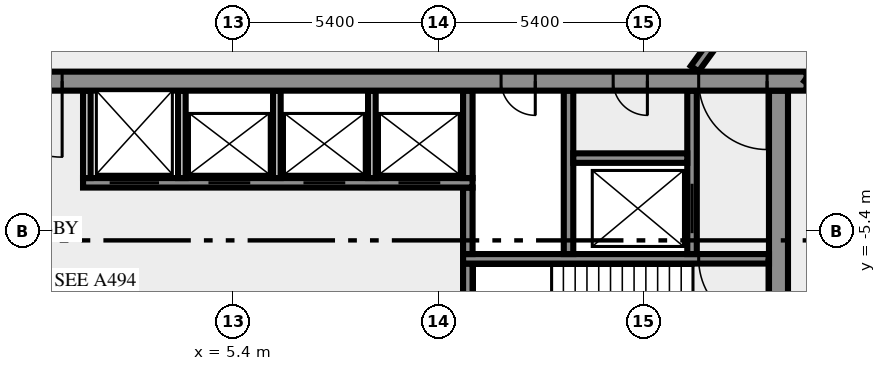
"""IFC4 building model, lengths in metres.
Left out: names, types, materials, properties, quantities, classifications, styles, units other than length and angle.
Written with IfcOpenShell. Run it as: python <this file> out.ifc"""

import sys

from ifc_helpers import new_model, si_unit, direction, frame, frame_2d, origin, place, context, subcontext, project, spatial, rectangle, extrude, element, fill, save


model = new_model("IFC4")
c1 = context("Model", 3, precision=1e-05, world=origin(), true_north=direction((0.0, 1.0)))
c2 = subcontext(c1, "Body", "Model", "MODEL_VIEW")
j1 = project(units=[si_unit("LENGTHUNIT", "METRE"), si_unit("PLANEANGLEUNIT", "RADIAN")], contexts=[c1])
p1 = place(None, origin())
s1 = spatial("IfcSite", under=j1, at=p1, CompositionType="ELEMENT")
p2 = place(p1, origin())
s2 = spatial("IfcBuilding", under=s1, at=p2, CompositionType="ELEMENT")
p3 = place(p2, frame((0.0, 0.0, 210.0)))
s3 = spatial("IfcBuildingStorey", under=s2, at=p3, CompositionType="ELEMENT", Elevation=210.0)
p4 = place(p3, frame((19.75, -10.5, 0.0), z_axis=(0.0, 0.0, 1.0), x_axis=(0.0, 1.0, 0.0)))
e1 = element("IfcWall", 1, at=p4, inside=s3, PredefinedType="SHEAR", context=c2, shape_type="SweptSolid", body=[
    extrude(rectangle(XDim=8.8, YDim=0.5, at=frame_2d((4.4, 0.0))), origin(), (0.0, 0.0, 1.0), 3.65),
])
p5 = place(p3, frame((11.575, -7.25, 0.0), z_axis=(0.0, 0.0, 1.0), x_axis=(0.0, 1.0, 0.0)))
e2 = element("IfcWall", 2, at=p5, inside=s3, PredefinedType="SHEAR", context=c2, shape_type="SweptSolid", body=[
    extrude(rectangle(XDim=1.0, YDim=0.25, at=frame_2d((0.5, 0.0))), origin(), (0.0, 0.0, 1.0), 3.65),
])
p6 = place(p3, frame((19.5, -6.125, 0.0), z_axis=(0.0, 0.0, 1.0), x_axis=(-1.0, 0.0, 0.0)))
e3 = element("IfcWall", 3, at=p6, inside=s3, PredefinedType="SHEAR", context=c2, shape_type="SweptSolid", body=[
    extrude(rectangle(XDim=8.05, YDim=0.25, at=frame_2d((4.025, 0.0))), origin(), (0.0, 0.0, 1.0), 3.65),
])
p7 = place(p6, frame((0.05, 0.0, 0.0)))
e4 = element("IfcOpeningElement", 4, at=p7, cuts=e3, PredefinedType="OPENING", context=c2, shape_type="SweptSolid", body=[
    extrude(rectangle(XDim=1.8, YDim=2.1, at=frame_2d((0.9, 1.05))), frame((0.0, 0.135, 0.0), z_axis=(0.0, -1.0, 0.0), x_axis=(1.0, 0.0, 0.0)), (0.0, 0.0, 1.0), 0.27),
])
p8 = place(p3, frame((11.575, -6.0, 0.0), z_axis=(0.0, 0.0, 1.0), x_axis=(0.0, 1.0, 0.0)))
e5 = element("IfcWall", 5, at=p8, inside=s3, PredefinedType="SHEAR", context=c2, shape_type="SweptSolid", body=[
    extrude(rectangle(XDim=1.75, YDim=0.25, at=frame_2d((0.875, 0.0))), origin(), (0.0, 0.0, 1.0), 3.65),
])
p9 = place(p3, frame((14.225, -6.0, 0.0), z_axis=(0.0, 0.0, 1.0), x_axis=(0.0, 1.0, 0.0)))
e6 = element("IfcWall", 6, at=p9, inside=s3, PredefinedType="SHEAR", context=c2, shape_type="SweptSolid", body=[
    extrude(rectangle(XDim=4.3, YDim=0.25, at=frame_2d((2.15, 0.0))), origin(), (0.0, 0.0, 1.0), 3.65),
])
p10 = place(p3, frame((17.475, -6.0, 0.0), z_axis=(0.0, 0.0, 1.0), x_axis=(0.0, 1.0, 0.0)))
e7 = element("IfcWall", 7, at=p10, inside=s3, PredefinedType="SHEAR", context=c2, shape_type="SweptSolid", body=[
    extrude(rectangle(XDim=4.3, YDim=0.25, at=frame_2d((2.15, 0.0))), origin(), (0.0, 0.0, 1.0), 3.65),
])
p11 = place(p10, frame((0.55, 0.0, 0.0)))
e8 = element("IfcOpeningElement", 8, at=p11, cuts=e7, PredefinedType="OPENING", context=c2, shape_type="SweptSolid", body=[
    extrude(rectangle(XDim=1.3, YDim=2.1, at=frame_2d((0.65, 1.05))), frame((0.0, 0.135, 0.0), z_axis=(0.0, -1.0, 0.0), x_axis=(1.0, 0.0, 0.0)), (0.0, 0.0, 1.0), 0.27),
])
p12 = place(p3, frame((1.45, -4.125, 0.0), z_axis=(0.0, 0.0, 1.0), x_axis=(1.0, 0.0, 0.0)))
e9 = element("IfcWall", 9, at=p12, inside=s3, PredefinedType="SHEAR", context=c2, shape_type="SweptSolid", body=[
    extrude(rectangle(XDim=10.25, YDim=0.25, at=frame_2d((5.125, 0.0))), origin(), (0.0, 0.0, 1.0), 3.65),
])
p13 = place(p12, frame((0.7, 0.0, 0.0)))
e10 = element("IfcOpeningElement", 10, at=p13, cuts=e9, PredefinedType="OPENING", context=c2, shape_type="SweptSolid", body=[
    extrude(rectangle(XDim=1.3, YDim=2.1, at=frame_2d((0.65, 1.05))), frame((0.0, 0.135, 0.0), z_axis=(0.0, -1.0, 0.0), x_axis=(1.0, 0.0, 0.0)), (0.0, 0.0, 1.0), 0.27),
])
p14 = place(p12, frame((3.3, 0.0, 0.0)))
e11 = element("IfcOpeningElement", 11, at=p14, cuts=e9, PredefinedType="OPENING", context=c2, shape_type="SweptSolid", body=[
    extrude(rectangle(XDim=1.1, YDim=2.1, at=frame_2d((0.55, 1.05))), frame((0.0, 0.135, 0.0), z_axis=(0.0, -1.0, 0.0), x_axis=(1.0, 0.0, 0.0)), (0.0, 0.0, 1.0), 0.27),
])
p15 = place(p12, frame((5.8, 0.0, 0.0)))
e12 = element("IfcOpeningElement", 12, at=p15, cuts=e9, PredefinedType="OPENING", context=c2, shape_type="SweptSolid", body=[
    extrude(rectangle(XDim=1.1, YDim=2.1, at=frame_2d((0.55, 1.05))), frame((0.0, 0.135, 0.0), z_axis=(0.0, -1.0, 0.0), x_axis=(1.0, 0.0, 0.0)), (0.0, 0.0, 1.0), 0.27),
])
p16 = place(p12, frame((8.3, 0.0, 0.0)))
e13 = element("IfcOpeningElement", 13, at=p16, cuts=e9, PredefinedType="OPENING", context=c2, shape_type="SweptSolid", body=[
    extrude(rectangle(XDim=1.1, YDim=2.1, at=frame_2d((0.55, 1.05))), frame((0.0, 0.135, 0.0), z_axis=(0.0, -1.0, 0.0), x_axis=(1.0, 0.0, 0.0)), (0.0, 0.0, 1.0), 0.27),
])
for number, where, z_axis, x_axis in (
    (14, (1.55, -4.0, 0.0), (0.0, 0.0, 1.0), (0.0, 1.0, 0.0)),
    (15, (4.05, -4.0, 0.0), (0.0, 0.0, 1.0), (0.0, 1.0, 0.0)),
    (16, (6.55, -4.0, 0.0), (0.0, 0.0, 1.0), (0.0, 1.0, 0.0)),
    (17, (9.05, -4.0, 0.0), (0.0, 0.0, 1.0), (0.0, 1.0, 0.0)),
):
    element("IfcWall", number, at=place(p3, frame(where, z_axis=z_axis, x_axis=x_axis)), inside=s3, PredefinedType="SOLIDWALL", context=c2, shape_type="SweptSolid", body=[
        extrude(rectangle(XDim=2.3, YDim=0.2, at=frame_2d((1.15, 0.0))), origin(), (0.0, 0.0, 1.0), 3.65),
    ])
p17 = place(p3, frame((11.575, -4.0, 0.0), z_axis=(0.0, 0.0, 1.0), x_axis=(0.0, 1.0, 0.0)))
e18 = element("IfcWall", 18, at=p17, inside=s3, PredefinedType="SHEAR", context=c2, shape_type="SweptSolid", body=[
    extrude(rectangle(XDim=2.3, YDim=0.25, at=frame_2d((1.15, 0.0))), origin(), (0.0, 0.0, 1.0), 3.65),
])
p18 = place(p3, frame((14.35, -3.475, 0.0), z_axis=(0.0, 0.0, 1.0), x_axis=(1.0, 0.0, 0.0)))
e19 = element("IfcWall", 19, at=p18, inside=s3, PredefinedType="SHEAR", context=c2, shape_type="SweptSolid", body=[
    extrude(rectangle(XDim=3.0, YDim=0.25, at=frame_2d((1.5, 0.0))), origin(), (0.0, 0.0, 1.0), 3.65),
])
p19 = place(p3, frame((20.49, -1.45, 0.0), z_axis=(0.0, 0.0, 1.0), x_axis=(-1.0, 0.0, 0.0)))
e20 = element("IfcWall", 20, at=p19, inside=s3, PredefinedType="SHEAR", context=c2, shape_type="SweptSolid", body=[
    extrude(rectangle(XDim=40.98, YDim=0.5, at=frame_2d((20.49, 0.0))), origin(), (0.0, 0.0, 1.0), 3.65),
])
p20 = place(p19, frame((38.14, 0.0, 0.0)))
e21 = element("IfcOpeningElement", 21, at=p20, cuts=e20, PredefinedType="OPENING", context=c2, shape_type="SweptSolid", body=[
    extrude(rectangle(XDim=1.8, YDim=2.1, at=frame_2d((0.9, 1.05))), frame((0.0, 0.26, 0.0), z_axis=(0.0, -1.0, 0.0), x_axis=(1.0, 0.0, 0.0)), (0.0, 0.0, 1.0), 0.52),
])
p21 = place(p19, frame((36.728, 0.0, 0.0)))
e22 = element("IfcOpeningElement", 22, at=p21, cuts=e20, PredefinedType="OPENING", context=c2, shape_type="SweptSolid", body=[
    extrude(rectangle(XDim=0.8, YDim=2.1, at=frame_2d((0.4, 1.05))), frame((0.0, 0.26, 0.0), z_axis=(0.0, -1.0, 0.0), x_axis=(1.0, 0.0, 0.0)), (0.0, 0.0, 1.0), 0.52),
])
p22 = place(p19, frame((35.153, 0.0, 0.0)))
e23 = element("IfcOpeningElement", 23, at=p22, cuts=e20, PredefinedType="OPENING", context=c2, shape_type="SweptSolid", body=[
    extrude(rectangle(XDim=0.8, YDim=2.1, at=frame_2d((0.4, 1.05))), frame((0.0, 0.26, 0.0), z_axis=(0.0, -1.0, 0.0), x_axis=(1.0, 0.0, 0.0)), (0.0, 0.0, 1.0), 0.52),
])
p23 = place(p19, frame((32.94, 0.0, 0.0)))
e24 = element("IfcOpeningElement", 24, at=p23, cuts=e20, PredefinedType="OPENING", context=c2, shape_type="SweptSolid", body=[
    extrude(rectangle(XDim=0.9, YDim=2.1, at=frame_2d((0.45, 1.05))), frame((0.0, 0.26, 0.0), z_axis=(0.0, -1.0, 0.0), x_axis=(1.0, 0.0, 0.0)), (0.0, 0.0, 1.0), 0.52),
])
p24 = place(p19, frame((30.702, 0.0, 0.0)))
e25 = element("IfcOpeningElement", 25, at=p24, cuts=e20, PredefinedType="OPENING", context=c2, shape_type="SweptSolid", body=[
    extrude(rectangle(XDim=0.9, YDim=2.1, at=frame_2d((0.45, 1.05))), frame((0.0, 0.26, 0.0), z_axis=(0.0, -1.0, 0.0), x_axis=(1.0, 0.0, 0.0)), (0.0, 0.0, 1.0), 0.52),
])
p25 = place(p19, frame((28.64, 0.0, 0.0)))
e26 = element("IfcOpeningElement", 26, at=p25, cuts=e20, PredefinedType="OPENING", context=c2, shape_type="SweptSolid", body=[
    extrude(rectangle(XDim=0.9, YDim=2.1, at=frame_2d((0.45, 1.05))), frame((0.0, 0.26, 0.0), z_axis=(0.0, -1.0, 0.0), x_axis=(1.0, 0.0, 0.0)), (0.0, 0.0, 1.0), 0.52),
])
p26 = place(p19, frame((25.778, 0.0, 0.0)))
e27 = element("IfcOpeningElement", 27, at=p26, cuts=e20, PredefinedType="OPENING", context=c2, shape_type="SweptSolid", body=[
    extrude(rectangle(XDim=0.9, YDim=2.1, at=frame_2d((0.45, 1.05))), frame((0.0, 0.26, 0.0), z_axis=(0.0, -1.0, 0.0), x_axis=(1.0, 0.0, 0.0)), (0.0, 0.0, 1.0), 0.52),
])
p27 = place(p19, frame((19.59, 0.0, 0.0)))
e28 = element("IfcOpeningElement", 28, at=p27, cuts=e20, PredefinedType="OPENING", context=c2, shape_type="SweptSolid", body=[
    extrude(rectangle(XDim=2.0, YDim=2.1, at=frame_2d((1.0, 1.05))), frame((0.0, 0.26, 0.0), z_axis=(0.0, -1.0, 0.0), x_axis=(1.0, 0.0, 0.0)), (0.0, 0.0, 1.0), 0.52),
])
p28 = place(p19, frame((7.14, 0.0, 0.0)))
e29 = element("IfcOpeningElement", 29, at=p28, cuts=e20, PredefinedType="OPENING", context=c2, shape_type="SweptSolid", body=[
    extrude(rectangle(XDim=0.9, YDim=2.1, at=frame_2d((0.45, 1.05))), frame((0.0, 0.26, 0.0), z_axis=(0.0, -1.0, 0.0), x_axis=(1.0, 0.0, 0.0)), (0.0, 0.0, 1.0), 0.52),
])
p29 = place(p19, frame((4.19, 0.0, 0.0)))
e30 = element("IfcOpeningElement", 30, at=p29, cuts=e20, PredefinedType="OPENING", context=c2, shape_type="SweptSolid", body=[
    extrude(rectangle(XDim=0.9, YDim=2.1, at=frame_2d((0.45, 1.05))), frame((0.0, 0.26, 0.0), z_axis=(0.0, -1.0, 0.0), x_axis=(1.0, 0.0, 0.0)), (0.0, 0.0, 1.0), 0.52),
])
p30 = place(p19, frame((1.04, 0.0, 0.0)))
e31 = element("IfcOpeningElement", 31, at=p30, cuts=e20, PredefinedType="OPENING", context=c2, shape_type="SweptSolid", body=[
    extrude(rectangle(XDim=1.8, YDim=2.1, at=frame_2d((0.9, 1.05))), frame((0.0, 0.26, 0.0), z_axis=(0.0, -1.0, 0.0), x_axis=(1.0, 0.0, 0.0)), (0.0, 0.0, 1.0), 0.52),
])
p31 = place(p3, frame((17.545, -1.125, 0.0), z_axis=(0.0, 0.0, 1.0), x_axis=(0.58779555165, 0.809009511354, 0.0)))
e32 = element("IfcWall", 32, at=p31, inside=s3, PredefinedType="SOLIDWALL", context=c2, shape_type="SweptSolid", body=[
    extrude(rectangle(XDim=18.103, YDim=0.25, at=frame_2d((9.052, 0.0))), origin(), (0.0, 0.0, 1.0), 3.65),
])
p32 = place(p31, frame((16.728, 0.0, 0.0)))
e33 = element("IfcOpeningElement", 33, at=p32, cuts=e32, PredefinedType="OPENING", context=c2, shape_type="SweptSolid", body=[
    extrude(rectangle(XDim=0.9, YDim=2.1, at=frame_2d((0.45, 1.05))), frame((0.0, 0.135, 0.0), z_axis=(0.0, -1.0, 0.0), x_axis=(1.0, 0.0, 0.0)), (0.0, 0.0, 1.0), 0.27),
])
p33 = place(p3, frame((30.183, 11.761, 0.0), z_axis=(0.0, 0.0, 1.0), x_axis=(-0.587781762867, -0.80901952958, 0.0)))
e34 = element("IfcWall", 34, at=p33, inside=s3, PredefinedType="SOLIDWALL", context=c2, shape_type="SweptSolid", body=[
    extrude(rectangle(XDim=16.42, YDim=0.25, at=frame_2d((8.21, 0.0))), origin(), (0.0, 0.0, 1.0), 3.65),
])
p34 = place(p33, frame((14.988, 0.0, 0.0)))
e35 = element("IfcOpeningElement", 35, at=p34, cuts=e34, PredefinedType="OPENING", context=c2, shape_type="SweptSolid", body=[
    extrude(rectangle(XDim=0.9, YDim=2.1, at=frame_2d((0.45, 1.05))), frame((0.0, 0.135, 0.0), z_axis=(0.0, -1.0, 0.0), x_axis=(1.0, 0.0, 0.0)), (0.0, 0.0, 1.0), 0.27),
])
p35 = place(p33, frame((0.225, 0.0, 0.0)))
e36 = element("IfcOpeningElement", 36, at=p35, cuts=e34, PredefinedType="OPENING", context=c2, shape_type="SweptSolid", body=[
    extrude(rectangle(XDim=0.9, YDim=2.1, at=frame_2d((0.45, 1.05))), frame((0.0, 0.135, 0.0), z_axis=(0.0, -1.0, 0.0), x_axis=(1.0, 0.0, 0.0)), (0.0, 0.0, 1.0), 0.27),
])
p36 = place(p7, origin())
e37 = element("IfcDoor", 37, at=p36, inside=s3, OperationType="DOUBLE_DOOR_SINGLE_SWING", PredefinedType="DOOR", context=c2, shape_type="SweptSolid", body=[
    extrude(rectangle(XDim=1.8, YDim=2.1, at=frame_2d((0.9, 1.05))), frame((0.0, 0.025, 0.0), z_axis=(0.0, -1.0, 0.0), x_axis=(1.0, 0.0, 0.0)), (0.0, 0.0, 1.0), 0.05),
])
fill(e4, e37)
p37 = place(p11, origin())
e38 = element("IfcDoor", 38, at=p37, inside=s3, OperationType="DOUBLE_DOOR_SLIDING", PredefinedType="DOOR", context=c2, shape_type="SweptSolid", body=[
    extrude(rectangle(XDim=1.3, YDim=2.1, at=frame_2d((0.65, 1.05))), frame((0.0, 0.025, 0.0), z_axis=(0.0, -1.0, 0.0), x_axis=(1.0, 0.0, 0.0)), (0.0, 0.0, 1.0), 0.05),
])
fill(e8, e38)
p38 = place(p13, origin())
e39 = element("IfcDoor", 39, at=p38, inside=s3, OperationType="DOUBLE_DOOR_SLIDING", PredefinedType="DOOR", context=c2, shape_type="SweptSolid", body=[
    extrude(rectangle(XDim=1.3, YDim=2.1, at=frame_2d((0.65, 1.05))), frame((0.0, 0.025, 0.0), z_axis=(0.0, -1.0, 0.0), x_axis=(1.0, 0.0, 0.0)), (0.0, 0.0, 1.0), 0.05),
])
fill(e10, e39)
p39 = place(p14, origin())
e40 = element("IfcDoor", 40, at=p39, inside=s3, OperationType="DOUBLE_DOOR_SLIDING", PredefinedType="DOOR", context=c2, shape_type="SweptSolid", body=[
    extrude(rectangle(XDim=1.1, YDim=2.1, at=frame_2d((0.55, 1.05))), frame((0.0, 0.025, 0.0), z_axis=(0.0, -1.0, 0.0), x_axis=(1.0, 0.0, 0.0)), (0.0, 0.0, 1.0), 0.05),
])
fill(e11, e40)
p40 = place(p15, origin())
e41 = element("IfcDoor", 41, at=p40, inside=s3, OperationType="DOUBLE_DOOR_SLIDING", PredefinedType="DOOR", context=c2, shape_type="SweptSolid", body=[
    extrude(rectangle(XDim=1.1, YDim=2.1, at=frame_2d((0.55, 1.05))), frame((0.0, 0.025, 0.0), z_axis=(0.0, -1.0, 0.0), x_axis=(1.0, 0.0, 0.0)), (0.0, 0.0, 1.0), 0.05),
])
fill(e12, e41)
p41 = place(p16, origin())
e42 = element("IfcDoor", 42, at=p41, inside=s3, OperationType="DOUBLE_DOOR_SLIDING", PredefinedType="DOOR", context=c2, shape_type="SweptSolid", body=[
    extrude(rectangle(XDim=1.1, YDim=2.1, at=frame_2d((0.55, 1.05))), frame((0.0, 0.025, 0.0), z_axis=(0.0, -1.0, 0.0), x_axis=(1.0, 0.0, 0.0)), (0.0, 0.0, 1.0), 0.05),
])
fill(e13, e42)
p42 = place(p27, origin())
e43 = element("IfcDoor", 43, at=p42, inside=s3, OperationType="DOUBLE_DOOR_SINGLE_SWING", PredefinedType="DOOR", context=c2, shape_type="SweptSolid", body=[
    extrude(rectangle(XDim=2.0, YDim=2.1, at=frame_2d((1.0, 1.05))), frame((0.0, 0.025, 0.0), z_axis=(0.0, -1.0, 0.0), x_axis=(1.0, 0.0, 0.0)), (0.0, 0.0, 1.0), 0.05),
])
fill(e28, e43)
p43 = place(p28, origin())
e44 = element("IfcDoor", 44, at=p43, inside=s3, OperationType="SINGLE_SWING_LEFT", PredefinedType="DOOR", context=c2, shape_type="SweptSolid", body=[
    extrude(rectangle(XDim=0.9, YDim=2.1, at=frame_2d((0.45, 1.05))), frame((0.0, 0.025, 0.0), z_axis=(0.0, -1.0, 0.0), x_axis=(1.0, 0.0, 0.0)), (0.0, 0.0, 1.0), 0.05),
])
fill(e29, e44)
p44 = place(p29, origin())
e45 = element("IfcDoor", 45, at=p44, inside=s3, OperationType="SINGLE_SWING_LEFT", PredefinedType="DOOR", context=c2, shape_type="SweptSolid", body=[
    extrude(rectangle(XDim=0.9, YDim=2.1, at=frame_2d((0.45, 1.05))), frame((0.0, 0.025, 0.0), z_axis=(0.0, -1.0, 0.0), x_axis=(1.0, 0.0, 0.0)), (0.0, 0.0, 1.0), 0.05),
])
fill(e30, e45)
p45 = place(p30, origin())
e46 = element("IfcDoor", 46, at=p45, inside=s3, OperationType="DOUBLE_DOOR_SINGLE_SWING", PredefinedType="DOOR", context=c2, shape_type="SweptSolid", body=[
    extrude(rectangle(XDim=1.8, YDim=2.1, at=frame_2d((0.9, 1.05))), frame((0.0, 0.025, 0.0), z_axis=(0.0, -1.0, 0.0), x_axis=(1.0, 0.0, 0.0)), (0.0, 0.0, 1.0), 0.05),
])
fill(e31, e46)
save(model, sys.argv[1])
